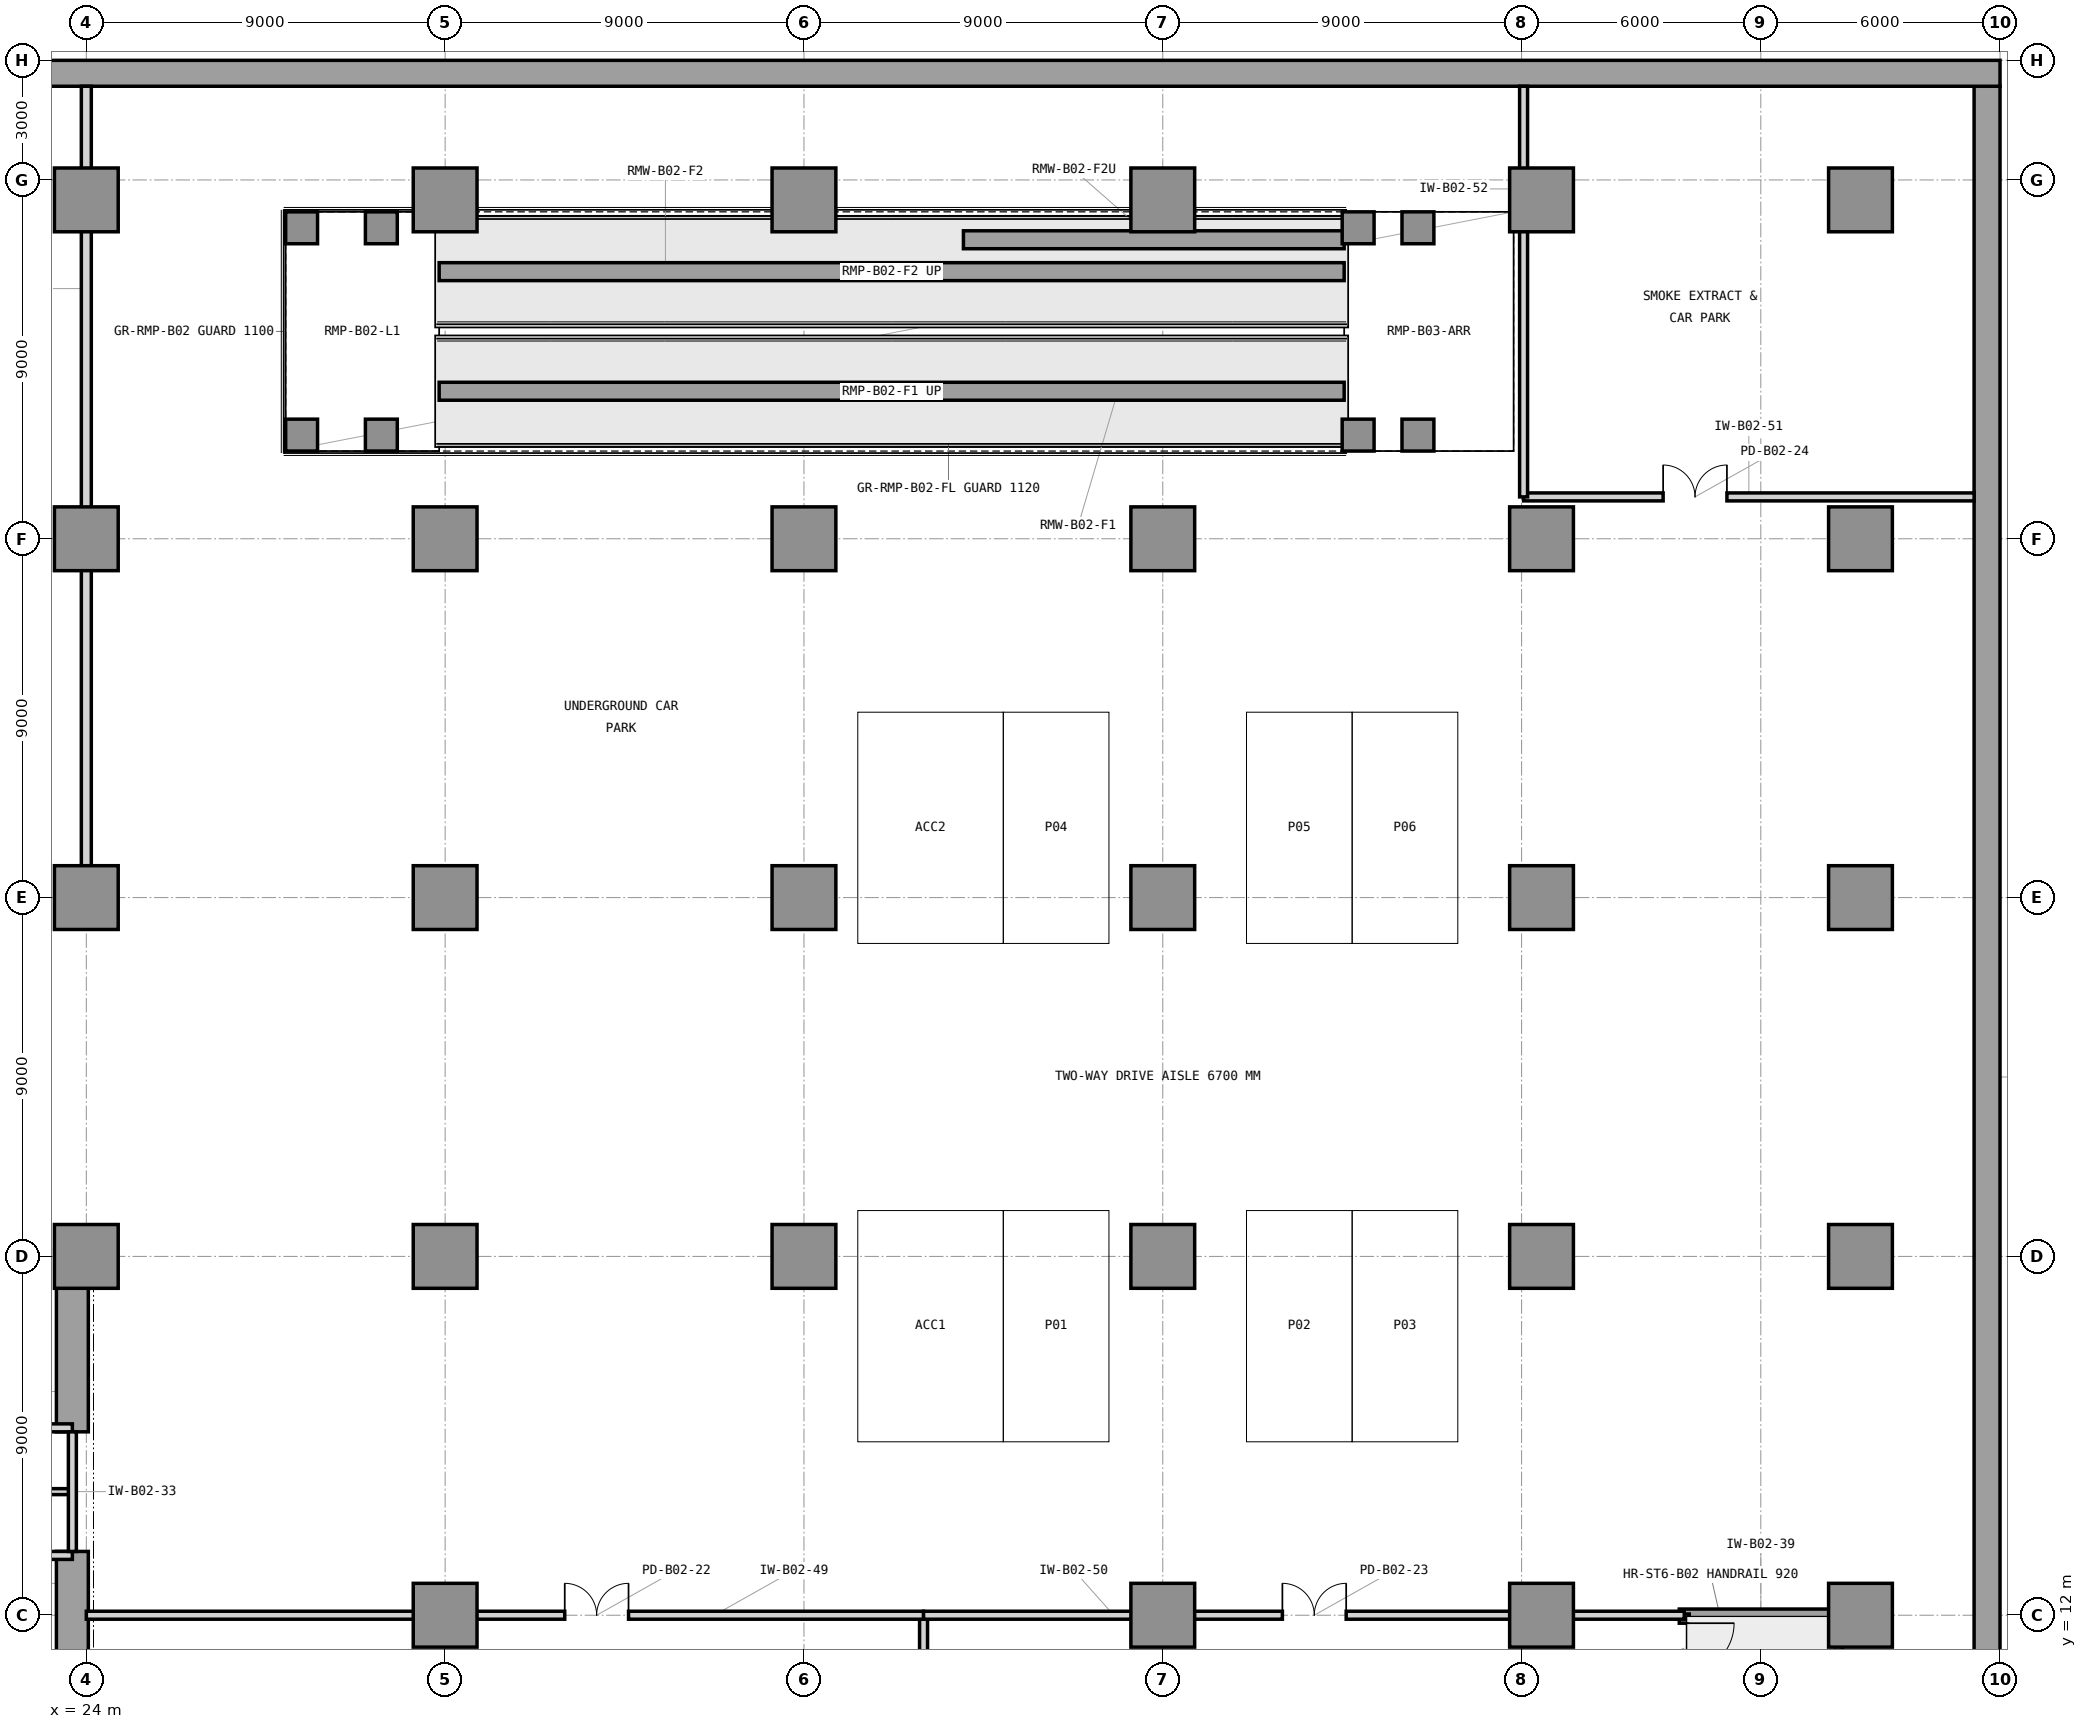
"""IFC4 building model, lengths in metres.
Left out: names, types, materials, properties, quantities, classifications, styles, units other than length and angle.
Written with IfcOpenShell. Run it as: python <this file> out.ifc"""

import sys

from ifc_helpers import new_model, si_unit, direction, frame, frame_2d, origin, origin_2d, place, context, subcontext, project, spatial, rectangle, extrude, element, fill, save


model = new_model("IFC4")
c1 = context("Model", 3, precision=1e-05, world=origin(), true_north=direction((0.0, 1.0)))
c2 = subcontext(c1, "Body", "Model", "MODEL_VIEW")
j1 = project(units=[si_unit("LENGTHUNIT", "METRE"), si_unit("PLANEANGLEUNIT", "RADIAN")], contexts=[c1])
p1 = place(None, origin())
s1 = spatial("IfcSite", under=j1, at=p1, CompositionType="ELEMENT")
p2 = place(p1, origin())
s2 = spatial("IfcBuilding", under=s1, at=p2, CompositionType="ELEMENT")
p3 = place(p2, frame((0.0, 0.0, -9.0)))
s3 = spatial("IfcBuildingStorey", under=s2, at=p3, CompositionType="ELEMENT", Elevation=-9.0)
p4 = place(p3, frame((71.675, 0.65, 0.0), z_axis=(0.0, 0.0, 1.0), x_axis=(0.0, 1.0, 0.0)))
e1 = element("IfcWall", 1, at=p4, inside=s3, PredefinedType="USERDEFINED", context=c2, shape_type="SweptSolid", body=[
    extrude(rectangle(XDim=49.7, YDim=0.65, at=frame_2d((24.85, 0.0))), origin(), (0.0, 0.0, 1.0), 4.5),
])
p5 = place(p3, frame((72.0, 50.675, 0.0), z_axis=(0.0, 0.0, 1.0), x_axis=(-1.0, 0.0, 0.0)))
e2 = element("IfcWall", 2, at=p5, inside=s3, PredefinedType="USERDEFINED", context=c2, shape_type="SweptSolid", body=[
    extrude(rectangle(XDim=72.0, YDim=0.65, at=frame_2d((36.0, 0.0))), origin(), (0.0, 0.0, 1.0), 4.5),
])
p6 = place(p3, frame((23.65, 10.4, 0.0), z_axis=(0.0, 0.0, 1.0), x_axis=(0.0, 1.0, 0.0)))
e3 = element("IfcWall", 3, at=p6, inside=s3, PredefinedType="SHEAR", context=c2, shape_type="SweptSolid", body=[
    extrude(rectangle(XDim=3.2, YDim=0.8, at=frame_2d((1.6, 0.0))), origin(), (0.0, 0.0, 1.0), 4.5),
])
p7 = place(p3, frame((23.65, 16.6, 0.0), z_axis=(0.0, 0.0, 1.0), x_axis=(0.0, 1.0, 0.0)))
e4 = element("IfcWall", 4, at=p7, inside=s3, PredefinedType="SHEAR", context=c2, shape_type="SweptSolid", body=[
    extrude(rectangle(XDim=4.05, YDim=0.8, at=frame_2d((2.025, 0.0))), origin(), (0.0, 0.0, 1.0), 4.5),
])
for number, where, z_axis, x_axis in (
    (5, (24.0, 21.0, 0.0), (0.0, 0.0, 1.0), (1.0, 0.0, 0.0)),
    (6, (24.0, 30.0, 0.0), (0.0, 0.0, 1.0), (1.0, 0.0, 0.0)),
    (7, (24.0, 39.0, 0.0), (0.0, 0.0, 1.0), (1.0, 0.0, 0.0)),
    (8, (24.0, 47.5, 0.0), (0.0, 0.0, 1.0), (1.0, 0.0, 0.0)),
    (9, (33.0, 12.0, 0.0), (0.0, 0.0, 1.0), (1.0, 0.0, 0.0)),
    (10, (33.0, 21.0, 0.0), (0.0, 0.0, 1.0), (1.0, 0.0, 0.0)),
    (11, (33.0, 30.0, 0.0), (0.0, 0.0, 1.0), (1.0, 0.0, 0.0)),
    (12, (33.0, 39.0, 0.0), (0.0, 0.0, 1.0), (1.0, 0.0, 0.0)),
    (13, (33.0, 47.5, 0.0), (0.0, 0.0, 1.0), (1.0, 0.0, 0.0)),
    (14, (42.0, 21.0, 0.0), (0.0, 0.0, 1.0), (1.0, 0.0, 0.0)),
    (15, (42.0, 30.0, 0.0), (0.0, 0.0, 1.0), (1.0, 0.0, 0.0)),
    (16, (42.0, 39.0, 0.0), (0.0, 0.0, 1.0), (1.0, 0.0, 0.0)),
    (17, (42.0, 47.5, 0.0), (0.0, 0.0, 1.0), (1.0, 0.0, 0.0)),
    (18, (51.0, 12.0, 0.0), (0.0, 0.0, 1.0), (1.0, 0.0, 0.0)),
    (19, (51.0, 21.0, 0.0), (0.0, 0.0, 1.0), (1.0, 0.0, 0.0)),
    (20, (51.0, 30.0, 0.0), (0.0, 0.0, 1.0), (1.0, 0.0, 0.0)),
    (21, (51.0, 39.0, 0.0), (0.0, 0.0, 1.0), (1.0, 0.0, 0.0)),
    (22, (51.0, 47.5, 0.0), (0.0, 0.0, 1.0), (1.0, 0.0, 0.0)),
    (23, (60.5, 12.0, 0.0), (0.0, 0.0, 1.0), (1.0, 0.0, 0.0)),
    (24, (60.5, 21.0, 0.0), (0.0, 0.0, 1.0), (1.0, 0.0, 0.0)),
    (25, (60.5, 30.0, 0.0), (0.0, 0.0, 1.0), (1.0, 0.0, 0.0)),
    (26, (60.5, 39.0, 0.0), (0.0, 0.0, 1.0), (1.0, 0.0, 0.0)),
    (27, (60.5, 47.5, 0.0), (0.0, 0.0, 1.0), (1.0, 0.0, 0.0)),
    (28, (68.5, 12.0, 0.0), (0.0, 0.0, 1.0), (1.0, 0.0, 0.0)),
    (29, (68.5, 21.0, 0.0), (0.0, 0.0, 1.0), (1.0, 0.0, 0.0)),
    (30, (68.5, 30.0, 0.0), (0.0, 0.0, 1.0), (1.0, 0.0, 0.0)),
    (31, (68.5, 39.0, 0.0), (0.0, 0.0, 1.0), (1.0, 0.0, 0.0)),
    (32, (68.5, 47.5, 0.0), (0.0, 0.0, 1.0), (1.0, 0.0, 0.0)),
):
    element("IfcColumn", number, at=place(p3, frame(where, z_axis=z_axis, x_axis=x_axis)), inside=s3, PredefinedType="COLUMN", context=c2, shape_type="SweptSolid", body=[
        extrude(rectangle(XDim=1.6, YDim=1.6, at=origin_2d()), origin(), (0.0, 0.0, 1.0), 4.5),
    ])
p8 = place(p3, frame((16.45, 16.7, 0.0), z_axis=(0.0, 0.0, 1.0), x_axis=(1.0, 0.0, 0.0)))
e33 = element("IfcWall", 33, at=p8, inside=s3, PredefinedType="PARTITIONING", context=c2, shape_type="SweptSolid", body=[
    extrude(rectangle(XDim=7.2, YDim=0.2, at=frame_2d((3.6, 0.0))), origin(), (0.0, 0.0, 1.0), 3.523),
])
p9 = place(p8, frame((0.25, 0.0, 0.0)))
e34 = element("IfcOpeningElement", 34, at=p9, cuts=e33, PredefinedType="OPENING", context=c2, shape_type="SweptSolid", body=[
    extrude(rectangle(XDim=1.2, YDim=2.2, at=frame_2d((0.6, 1.1))), frame((0.0, 0.11, 0.0), z_axis=(0.0, -1.0, 0.0), x_axis=(1.0, 0.0, 0.0)), (0.0, 0.0, 1.0), 0.22),
])
p10 = place(p3, frame((14.7, 13.5, 0.0), z_axis=(0.0, 0.0, 1.0), x_axis=(1.0, 0.0, 0.0)))
e35 = element("IfcWall", 35, at=p10, inside=s3, PredefinedType="PARTITIONING", context=c2, shape_type="SweptSolid", body=[
    extrude(rectangle(XDim=8.95, YDim=0.2, at=frame_2d((4.475, 0.0))), origin(), (0.0, 0.0, 1.0), 3.523),
])
p11 = place(p3, frame((18.25, 15.1, 0.0), z_axis=(0.0, 0.0, 1.0), x_axis=(1.0, 0.0, 0.0)))
e36 = element("IfcWall", 36, at=p11, inside=s3, PredefinedType="PARTITIONING", context=c2, shape_type="SweptSolid", body=[
    extrude(rectangle(XDim=5.4, YDim=0.15, at=frame_2d((2.7, 0.0))), origin(), (0.0, 0.0, 1.0), 4.14),
])
p12 = place(p3, frame((23.65, 13.6, 0.0), z_axis=(0.0, 0.0, 1.0), x_axis=(0.0, 1.0, 0.0)))
e37 = element("IfcWall", 37, at=p12, inside=s3, PredefinedType="PARTITIONING", context=c2, shape_type="SweptSolid", body=[
    extrude(rectangle(XDim=3.0, YDim=0.2, at=frame_2d((1.5, 0.0))), origin(), (0.0, 0.0, 1.0), 4.14),
])
p13 = place(p3, frame((63.955, 12.03, 0.0), z_axis=(0.0, 0.0, 1.0), x_axis=(1.0, 0.0, 0.0)))
e38 = element("IfcWall", 38, at=p13, inside=s3, PredefinedType="SHEAR", context=c2, shape_type="SweptSolid", body=[
    extrude(rectangle(XDim=4.09, YDim=0.25, at=frame_2d((2.045, 0.0))), origin(), (0.0, 0.0, 1.0), 4.5),
])
p14 = place(p3, frame((67.92, 4.53, 0.0), z_axis=(0.0, 0.0, 1.0), x_axis=(0.0, 1.0, 0.0)))
e39 = element("IfcWall", 39, at=p14, inside=s3, PredefinedType="SHEAR", context=c2, shape_type="SweptSolid", body=[
    extrude(rectangle(XDim=7.5, YDim=0.25, at=frame_2d((3.75, 0.0))), origin(), (0.0, 0.0, 1.0), 4.5),
])
p15 = place(p3, frame((64.08, 4.53, 0.0), z_axis=(0.0, 0.0, 1.0), x_axis=(0.0, 1.0, 0.0)))
e40 = element("IfcWall", 40, at=p15, inside=s3, PredefinedType="SHEAR", context=c2, shape_type="SweptSolid", body=[
    extrude(rectangle(XDim=7.5, YDim=0.25, at=frame_2d((3.75, 0.0))), origin(), (0.0, 0.0, 1.0), 4.5),
])
p16 = place(p15, frame((6.02, 0.0, 0.0)))
e41 = element("IfcOpeningElement", 41, at=p16, cuts=e40, PredefinedType="OPENING", context=c2, shape_type="SweptSolid", body=[
    extrude(rectangle(XDim=1.25, YDim=2.2, at=frame_2d((0.625, 1.1))), frame((0.0, 0.135, 0.0), z_axis=(0.0, -1.0, 0.0), x_axis=(1.0, 0.0, 0.0)), (0.0, 0.0, 1.0), 0.27),
])
p17 = place(p3, frame((24.0, 30.05, 0.0), z_axis=(0.0, 0.0, 1.0), x_axis=(0.0, 1.0, 0.0)))
e42 = element("IfcWall", 42, at=p17, inside=s3, PredefinedType="PARTITIONING", context=c2, shape_type="SweptSolid", body=[
    extrude(rectangle(XDim=20.3, YDim=0.25, at=frame_2d((10.15, 0.0))), origin(), (0.0, 0.0, 1.0), 3.2),
])
p18 = place(p3, frame((45.0, 0.65, 0.0), z_axis=(0.0, 0.0, 1.0), x_axis=(0.0, 1.0, 0.0)))
e43 = element("IfcWall", 43, at=p18, inside=s3, PredefinedType="PARTITIONING", context=c2, shape_type="SweptSolid", body=[
    extrude(rectangle(XDim=11.35, YDim=0.2, at=frame_2d((5.675, 0.0))), origin(), (0.0, 0.0, 1.0), 4.14),
])
p19 = place(p3, frame((24.0, 12.0, 0.0), z_axis=(0.0, 0.0, 1.0), x_axis=(1.0, 0.0, 0.0)))
e44 = element("IfcWall", 44, at=p19, inside=s3, PredefinedType="PARTITIONING", context=c2, shape_type="SweptSolid", body=[
    extrude(rectangle(XDim=21.0, YDim=0.2, at=frame_2d((10.5, 0.0))), origin(), (0.0, 0.0, 1.0), 3.2),
])
p20 = place(p19, frame((12.0, 0.0, 0.0)))
e45 = element("IfcOpeningElement", 45, at=p20, cuts=e44, PredefinedType="OPENING", context=c2, shape_type="SweptSolid", body=[
    extrude(rectangle(XDim=1.6, YDim=2.3, at=frame_2d((0.8, 1.15))), frame((0.0, 0.11, 0.0), z_axis=(0.0, -1.0, 0.0), x_axis=(1.0, 0.0, 0.0)), (0.0, 0.0, 1.0), 0.22),
])
p21 = place(p3, frame((45.0, 12.0, 0.0), z_axis=(0.0, 0.0, 1.0), x_axis=(1.0, 0.0, 0.0)))
e46 = element("IfcWall", 46, at=p21, inside=s3, PredefinedType="PARTITIONING", context=c2, shape_type="SweptSolid", body=[
    extrude(rectangle(XDim=19.08, YDim=0.2, at=frame_2d((9.54, 0.0))), origin(), (0.0, 0.0, 1.0), 3.2),
])
p22 = place(p21, frame((9.0, 0.0, 0.0)))
e47 = element("IfcOpeningElement", 47, at=p22, cuts=e46, PredefinedType="OPENING", context=c2, shape_type="SweptSolid", body=[
    extrude(rectangle(XDim=1.6, YDim=2.3, at=frame_2d((0.8, 1.15))), frame((0.0, 0.11, 0.0), z_axis=(0.0, -1.0, 0.0), x_axis=(1.0, 0.0, 0.0)), (0.0, 0.0, 1.0), 0.22),
])
p23 = place(p3, frame((60.05, 40.05, 0.0), z_axis=(0.0, 0.0, 1.0), x_axis=(1.0, 0.0, 0.0)))
e48 = element("IfcWall", 48, at=p23, inside=s3, PredefinedType="PARTITIONING", context=c2, shape_type="SweptSolid", body=[
    extrude(rectangle(XDim=11.3, YDim=0.2, at=frame_2d((5.65, 0.0))), origin(), (0.0, 0.0, 1.0), 4.14),
])
p24 = place(p23, frame((3.5, 0.0, 0.0)))
e49 = element("IfcOpeningElement", 49, at=p24, cuts=e48, PredefinedType="OPENING", context=c2, shape_type="SweptSolid", body=[
    extrude(rectangle(XDim=1.6, YDim=2.3, at=frame_2d((0.8, 1.15))), frame((0.0, 0.11, 0.0), z_axis=(0.0, -1.0, 0.0), x_axis=(1.0, 0.0, 0.0)), (0.0, 0.0, 1.0), 0.22),
])
p25 = place(p3, frame((60.05, 40.05, 0.0), z_axis=(0.0, 0.0, 1.0), x_axis=(0.0, 1.0, 0.0)))
e50 = element("IfcWall", 50, at=p25, inside=s3, PredefinedType="PARTITIONING", context=c2, shape_type="SweptSolid", body=[
    extrude(rectangle(XDim=10.3, YDim=0.2, at=frame_2d((5.15, 0.0))), origin(), (0.0, 0.0, 1.0), 3.2),
])
for number, where, z_axis, x_axis in (
    (51, (29.4, 41.6, 0.0), (0.0, 0.0, 1.0), (1.0, 0.0, 0.0)),
    (52, (29.4, 46.8, 0.0), (0.0, 0.0, 1.0), (1.0, 0.0, 0.0)),
    (53, (31.4, 41.6, 0.0), (0.0, 0.0, 1.0), (1.0, 0.0, 0.0)),
    (54, (31.4, 46.8, 0.0), (0.0, 0.0, 1.0), (1.0, 0.0, 0.0)),
    (55, (55.9, 41.6, 0.0), (0.0, 0.0, 1.0), (1.0, 0.0, 0.0)),
    (56, (55.9, 46.8, 0.0), (0.0, 0.0, 1.0), (1.0, 0.0, 0.0)),
    (57, (57.4, 41.6, 0.0), (0.0, 0.0, 1.0), (1.0, 0.0, 0.0)),
    (58, (57.4, 46.8, 0.0), (0.0, 0.0, 1.0), (1.0, 0.0, 0.0)),
):
    element("IfcColumn", number, at=place(p3, frame(where, z_axis=z_axis, x_axis=x_axis)), inside=s3, PredefinedType="COLUMN", context=c2, shape_type="SweptSolid", body=[
        extrude(rectangle(XDim=0.8, YDim=0.8, at=origin_2d()), origin(), (0.0, 0.0, 1.0), 4.5),
    ])
p26 = place(p3, frame((32.85, 45.7, 0.0), z_axis=(0.0, 0.0, 1.0), x_axis=(1.0, 0.0, 0.0)))
e59 = element("IfcWall", 59, at=p26, inside=s3, PredefinedType="SHEAR", context=c2, shape_type="SweptSolid", body=[
    extrude(rectangle(XDim=22.7, YDim=0.45, at=frame_2d((11.35, 0.0))), origin(), (0.0, 0.0, 1.0), 2.01),
])
p27 = place(p3, frame((46.0, 46.5, 0.0), z_axis=(0.0, 0.0, 1.0), x_axis=(1.0, 0.0, 0.0)))
e60 = element("IfcWall", 60, at=p27, inside=s3, PredefinedType="SHEAR", context=c2, shape_type="SweptSolid", body=[
    extrude(rectangle(XDim=9.55, YDim=0.45, at=frame_2d((4.775, 0.0))), origin(), (0.0, 0.0, 1.0), 4.5),
])
p28 = place(p3, frame((32.85, 42.7, 0.0), z_axis=(0.0, 0.0, 1.0), x_axis=(1.0, 0.0, 0.0)))
e61 = element("IfcWall", 61, at=p28, inside=s3, PredefinedType="SHEAR", context=c2, shape_type="SweptSolid", body=[
    extrude(rectangle(XDim=22.7, YDim=0.45, at=frame_2d((11.35, 0.0))), origin(), (0.0, 0.0, 1.0), 4.26),
])
p29 = place(p16, frame((1.25, 0.0, 0.0), z_axis=(0.0, 0.0, 1.0), x_axis=(-1.0, 0.0, 0.0)))
e62 = element("IfcDoor", 62, at=p29, inside=s3, OperationType="SINGLE_SWING_LEFT", PredefinedType="DOOR", context=c2, shape_type="SweptSolid", body=[
    extrude(rectangle(XDim=1.25, YDim=2.2, at=frame_2d((0.625, 1.1))), frame((0.0, 0.025, 0.0), z_axis=(0.0, -1.0, 0.0), x_axis=(1.0, 0.0, 0.0)), (0.0, 0.0, 1.0), 0.05),
])
fill(e41, e62)
p30 = place(p20, origin())
e63 = element("IfcDoor", 63, at=p30, inside=s3, OperationType="DOUBLE_DOOR_SINGLE_SWING", PredefinedType="DOOR", context=c2, shape_type="SweptSolid", body=[
    extrude(rectangle(XDim=1.6, YDim=2.3, at=frame_2d((0.8, 1.15))), frame((0.0, 0.025, 0.0), z_axis=(0.0, -1.0, 0.0), x_axis=(1.0, 0.0, 0.0)), (0.0, 0.0, 1.0), 0.05),
])
fill(e45, e63)
p31 = place(p22, origin())
e64 = element("IfcDoor", 64, at=p31, inside=s3, OperationType="DOUBLE_DOOR_SINGLE_SWING", PredefinedType="DOOR", context=c2, shape_type="SweptSolid", body=[
    extrude(rectangle(XDim=1.6, YDim=2.3, at=frame_2d((0.8, 1.15))), frame((0.0, 0.025, 0.0), z_axis=(0.0, -1.0, 0.0), x_axis=(1.0, 0.0, 0.0)), (0.0, 0.0, 1.0), 0.05),
])
fill(e47, e64)
p32 = place(p24, origin())
e65 = element("IfcDoor", 65, at=p32, inside=s3, OperationType="DOUBLE_DOOR_SINGLE_SWING", PredefinedType="DOOR", context=c2, shape_type="SweptSolid", body=[
    extrude(rectangle(XDim=1.6, YDim=2.3, at=frame_2d((0.8, 1.15))), frame((0.0, 0.025, 0.0), z_axis=(0.0, -1.0, 0.0), x_axis=(1.0, 0.0, 0.0)), (0.0, 0.0, 1.0), 0.05),
])
fill(e49, e65)
save(model, sys.argv[1])
